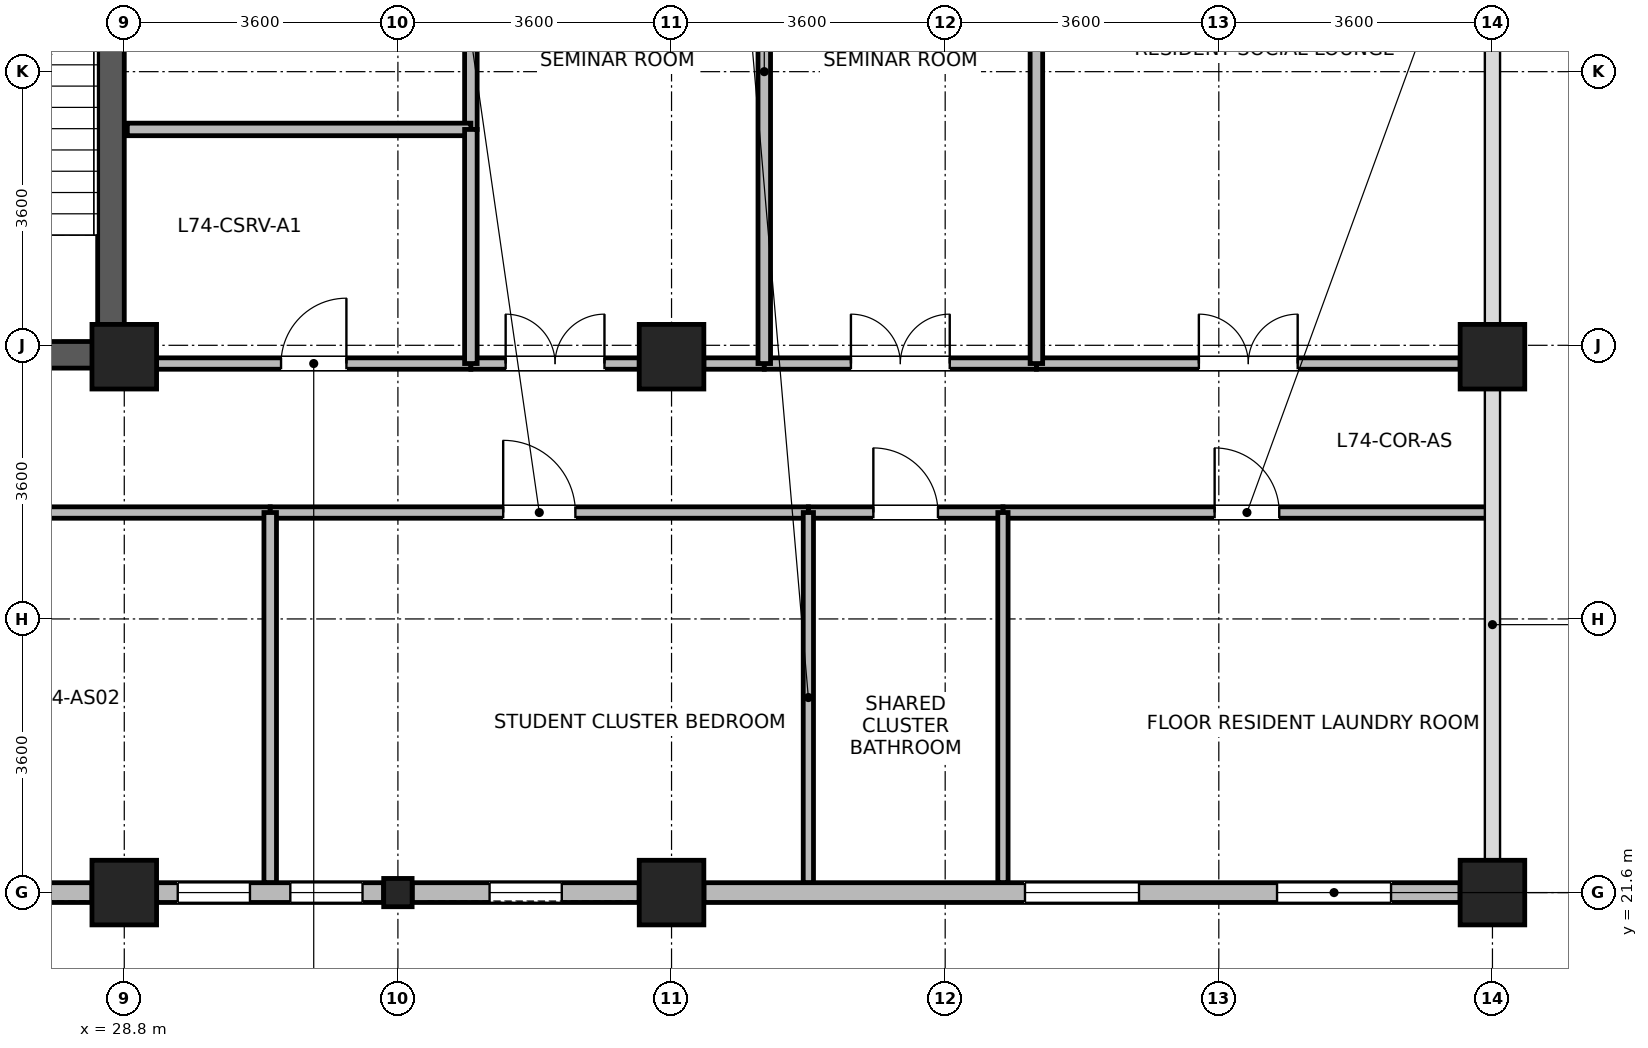
"""IFC4 building model, lengths in metres.
Left out: names, types, materials, properties, quantities, classifications, styles, units other than length and angle.
Written with IfcOpenShell. Run it as: python <this file> out.ifc"""

import sys

from ifc_helpers import new_model, si_unit, direction, frame, frame_2d, origin, origin_2d, place, context, subcontext, project, spatial, rectangle, i_section, extrude, source, transform, mapped, element, fill, save


model = new_model("IFC4")
c1 = context("Model", 3, precision=1e-05, world=origin(), true_north=direction((0.0, 1.0)))
c2 = subcontext(c1, "Body", "Model", "MODEL_VIEW")
j1 = project(units=[si_unit("LENGTHUNIT", "METRE"), si_unit("PLANEANGLEUNIT", "RADIAN")], contexts=[c1])
p1 = place(None, origin())
s1 = spatial("IfcSite", under=j1, at=p1, CompositionType="ELEMENT")
p2 = place(p1, origin())
s2 = spatial("IfcBuilding", under=s1, at=p2, CompositionType="ELEMENT")
p3 = place(p2, frame((0.0, 0.0, 286.9)))
s3 = spatial("IfcBuildingStorey", under=s2, at=p3, CompositionType="ELEMENT", Elevation=286.9)
p4 = place(p3, frame((28.625, 28.5, 0.0), z_axis=(0.0, 0.0, 1.0), x_axis=(0.0, 1.0, 0.0)))
e1 = element("IfcWall", 1, at=p4, inside=s3, PredefinedType="SHEAR", context=c2, shape_type="SweptSolid", body=[
    extrude(rectangle(XDim=7.7, YDim=0.35, at=frame_2d((3.85, 0.0))), origin(), (0.0, 0.0, 1.0), 3.475),
])
p5 = place(p3, frame((25.25, 28.675, 0.0), z_axis=(0.0, 0.0, 1.0), x_axis=(1.0, 0.0, 0.0)))
e2 = element("IfcWall", 2, at=p5, inside=s3, PredefinedType="SHEAR", context=c2, shape_type="SweptSolid", body=[
    extrude(rectangle(XDim=3.2, YDim=0.35, at=frame_2d((1.6, 0.0))), origin(), (0.0, 0.0, 1.0), 3.475),
])
m1 = source(origin(), c2, "Body", "SweptSolid", [
    extrude(rectangle(XDim=0.85, YDim=0.85, at=origin_2d()), origin(), (0.0, 0.0, 1.0), 3.7),
])
for number, where, z_axis, x_axis in (
    (3, (28.8, 21.6, 0.0), (0.0, 0.0, 1.0), (1.0, 0.0, 0.0)),
    (4, (28.8, 28.65, 0.0), (0.0, 0.0, 1.0), (1.0, 0.0, 0.0)),
    (5, (36.0, 21.6, 0.0), (0.0, 0.0, 1.0), (1.0, 0.0, 0.0)),
    (6, (36.0, 28.65, 0.0), (0.0, 0.0, 1.0), (1.0, 0.0, 0.0)),
    (7, (46.8, 21.6, 0.0), (0.0, 0.0, 1.0), (1.0, 0.0, 0.0)),
    (8, (46.8, 28.65, 0.0), (0.0, 0.0, 1.0), (1.0, 0.0, 0.0)),
):
    element("IfcColumn", number, at=place(p3, frame(where, z_axis=z_axis, x_axis=x_axis)), inside=s3, PredefinedType="COLUMN", context=c2, shape_type="MappedRepresentation", body=[
        mapped(m1, transform((0.0, 0.0, 0.0), x_axis=(1.0, 0.0, 0.0), y_axis=(0.0, 1.0, 0.0), z_axis=(0.0, 0.0, 1.0), scale=1.0)),
    ])
m2 = source(origin(), c2, "Body", "SweptSolid", [
    extrude(i_section(OverallWidth=0.374, OverallDepth=0.372, WebThickness=0.015, FlangeThickness=0.026, FilletRadius=0.015, at=origin_2d()), origin(), (0.0, 0.0, 1.0), 3.7),
])
p6 = place(p3, frame((32.4, 21.6, 0.0), z_axis=(0.0, 0.0, 1.0), x_axis=(1.0, 0.0, 0.0)))
e9 = element("IfcColumn", 9, at=p6, inside=s3, PredefinedType="COLUMN", context=c2, shape_type="MappedRepresentation", body=[
    mapped(m2, transform((0.0, 0.0, 0.0), x_axis=(1.0, 0.0, 0.0), y_axis=(0.0, 1.0, 0.0), z_axis=(0.0, 0.0, 1.0), scale=1.0)),
])
p7 = place(p3, frame((28.374, 21.6, 0.0), z_axis=(0.0, 0.0, 1.0), x_axis=(-1.0, 0.0, 0.0)))
e10 = element("IfcWall", 10, at=p7, inside=s3, PredefinedType="STANDARD", context=c2, shape_type="SweptSolid", body=[
    extrude(rectangle(XDim=2.986, YDim=0.26, at=frame_2d((1.493, 0.0))), origin(), (0.0, 0.0, 1.0), 3.055),
])
p8 = place(p7, frame((1.018, 0.0, 0.85)))
e11 = element("IfcOpeningElement", 11, at=p8, cuts=e10, PredefinedType="OPENING", context=c2, shape_type="SweptSolid", body=[
    extrude(rectangle(XDim=0.95, YDim=1.75, at=frame_2d((0.475, 0.875))), frame((0.0, 0.14, 0.0), z_axis=(0.0, -1.0, 0.0), x_axis=(1.0, 0.0, 0.0)), (0.0, 0.0, 1.0), 0.28),
])
p9 = place(p3, frame((32.212, 21.6, 0.0), z_axis=(0.0, 0.0, 1.0), x_axis=(-1.0, 0.0, 0.0)))
e12 = element("IfcWall", 12, at=p9, inside=s3, PredefinedType="STANDARD", context=c2, shape_type="SweptSolid", body=[
    extrude(rectangle(XDim=2.986, YDim=0.26, at=frame_2d((1.493, 0.0))), origin(), (0.0, 0.0, 1.0), 3.055),
])
p10 = place(p9, frame((0.278, 0.0, 0.85)))
e13 = element("IfcOpeningElement", 13, at=p10, cuts=e12, PredefinedType="OPENING", context=c2, shape_type="SweptSolid", body=[
    extrude(rectangle(XDim=0.95, YDim=1.75, at=frame_2d((0.475, 0.875))), frame((0.0, 0.14, 0.0), z_axis=(0.0, -1.0, 0.0), x_axis=(1.0, 0.0, 0.0)), (0.0, 0.0, 1.0), 0.28),
])
p11 = place(p9, frame((1.759, 0.0, 0.85)))
e14 = element("IfcOpeningElement", 14, at=p11, cuts=e12, PredefinedType="OPENING", context=c2, shape_type="SweptSolid", body=[
    extrude(rectangle(XDim=0.95, YDim=1.75, at=frame_2d((0.475, 0.875))), frame((0.0, 0.14, 0.0), z_axis=(0.0, -1.0, 0.0), x_axis=(1.0, 0.0, 0.0)), (0.0, 0.0, 1.0), 0.28),
])
p12 = place(p3, frame((35.574, 21.6, 0.0), z_axis=(0.0, 0.0, 1.0), x_axis=(-1.0, 0.0, 0.0)))
e15 = element("IfcWall", 15, at=p12, inside=s3, PredefinedType="STANDARD", context=c2, shape_type="SweptSolid", body=[
    extrude(rectangle(XDim=2.986, YDim=0.26, at=frame_2d((1.493, 0.0))), origin(), (0.0, 0.0, 1.0), 3.055),
])
p13 = place(p12, frame((1.018, 0.0, 0.85)))
e16 = element("IfcOpeningElement", 16, at=p13, cuts=e15, PredefinedType="OPENING", context=c2, shape_type="SweptSolid", body=[
    extrude(rectangle(XDim=0.95, YDim=1.75, at=frame_2d((0.475, 0.875))), frame((0.0, 0.14, 0.0), z_axis=(0.0, -1.0, 0.0), x_axis=(1.0, 0.0, 0.0)), (0.0, 0.0, 1.0), 0.28),
])
p14 = place(p3, frame((46.374, 21.6, 0.0), z_axis=(0.0, 0.0, 1.0), x_axis=(-1.0, 0.0, 0.0)))
e17 = element("IfcWall", 17, at=p14, inside=s3, PredefinedType="STANDARD", context=c2, shape_type="SweptSolid", body=[
    extrude(rectangle(XDim=9.948, YDim=0.26, at=frame_2d((4.974, 0.0))), origin(), (0.0, 0.0, 1.0), 3.055),
])
p15 = place(p14, frame((0.908, 0.0, 0.85)))
e18 = element("IfcOpeningElement", 18, at=p15, cuts=e17, PredefinedType="OPENING", context=c2, shape_type="SweptSolid", body=[
    extrude(rectangle(XDim=1.5, YDim=1.85, at=frame_2d((0.75, 0.925))), frame((0.0, 0.14, 0.0), z_axis=(0.0, -1.0, 0.0), x_axis=(1.0, 0.0, 0.0)), (0.0, 0.0, 1.0), 0.28),
])
p16 = place(p14, frame((4.224, 0.0, 0.85)))
e19 = element("IfcOpeningElement", 19, at=p16, cuts=e17, PredefinedType="OPENING", context=c2, shape_type="SweptSolid", body=[
    extrude(rectangle(XDim=1.5, YDim=1.85, at=frame_2d((0.75, 0.925))), frame((0.0, 0.14, 0.0), z_axis=(0.0, -1.0, 0.0), x_axis=(1.0, 0.0, 0.0)), (0.0, 0.0, 1.0), 0.28),
])
p17 = place(p3, frame((17.78, 26.6, 0.0), z_axis=(0.0, 0.0, 1.0), x_axis=(1.0, 0.0, 0.0)))
e20 = element("IfcWall", 20, at=p17, inside=s3, PredefinedType="PARTITIONING", context=c2, shape_type="SweptSolid", body=[
    extrude(rectangle(XDim=12.94, YDim=0.15, at=frame_2d((6.47, 0.0))), origin(), (0.0, 0.0, 1.0), 3.455),
])
p18 = place(p17, frame((6.02, 0.0, 0.0)))
e21 = element("IfcOpeningElement", 21, at=p18, cuts=e20, PredefinedType="OPENING", context=c2, shape_type="SweptSolid", body=[
    extrude(rectangle(XDim=0.9, YDim=2.08, at=frame_2d((0.45, 1.04))), frame((0.0, 0.085, 0.0), z_axis=(0.0, -1.0, 0.0), x_axis=(1.0, 0.0, 0.0)), (0.0, 0.0, 1.0), 0.17),
])
p19 = place(p3, frame((30.72, 26.6, 0.0), z_axis=(0.0, 0.0, 1.0), x_axis=(1.0, 0.0, 0.0)))
e22 = element("IfcWall", 22, at=p19, inside=s3, PredefinedType="PARTITIONING", context=c2, shape_type="SweptSolid", body=[
    extrude(rectangle(XDim=7.08, YDim=0.15, at=frame_2d((3.54, 0.0))), origin(), (0.0, 0.0, 1.0), 3.455),
])
p20 = place(p19, frame((3.065, 0.0, 0.0)))
e23 = element("IfcOpeningElement", 23, at=p20, cuts=e22, PredefinedType="OPENING", context=c2, shape_type="SweptSolid", body=[
    extrude(rectangle(XDim=0.95, YDim=2.1, at=frame_2d((0.475, 1.05))), frame((0.0, 0.085, 0.0), z_axis=(0.0, -1.0, 0.0), x_axis=(1.0, 0.0, 0.0)), (0.0, 0.0, 1.0), 0.17),
])
p21 = place(p3, frame((40.36, 26.6, 0.0), z_axis=(0.0, 0.0, 1.0), x_axis=(1.0, 0.0, 0.0)))
e24 = element("IfcWall", 24, at=p21, inside=s3, PredefinedType="PARTITIONING", context=c2, shape_type="SweptSolid", body=[
    extrude(rectangle(XDim=6.42, YDim=0.15, at=frame_2d((3.21, 0.0))), origin(), (0.0, 0.0, 1.0), 3.455),
])
p22 = place(p21, frame((2.785, 0.0, 0.0)))
e25 = element("IfcOpeningElement", 25, at=p22, cuts=e24, PredefinedType="OPENING", context=c2, shape_type="SweptSolid", body=[
    extrude(rectangle(XDim=0.85, YDim=2.04, at=frame_2d((0.425, 1.02))), frame((0.0, 0.085, 0.0), z_axis=(0.0, -1.0, 0.0), x_axis=(1.0, 0.0, 0.0)), (0.0, 0.0, 1.0), 0.17),
])
p23 = place(p3, frame((40.8, 28.56, 0.0), z_axis=(0.0, 0.0, 1.0), x_axis=(1.0, 0.0, 0.0)))
e26 = element("IfcWall", 26, at=p23, inside=s3, PredefinedType="PARTITIONING", context=c2, shape_type="SweptSolid", body=[
    extrude(rectangle(XDim=5.575, YDim=0.15, at=frame_2d((2.788, 0.0))), origin(), (0.0, 0.0, 1.0), 2.905),
])
p24 = place(p23, frame((2.137, 0.0, 0.0)))
e27 = element("IfcOpeningElement", 27, at=p24, cuts=e26, PredefinedType="OPENING", context=c2, shape_type="SweptSolid", body=[
    extrude(rectangle(XDim=1.3, YDim=2.12, at=frame_2d((0.65, 1.06))), frame((0.0, 0.085, 0.0), z_axis=(0.0, -1.0, 0.0), x_axis=(1.0, 0.0, 0.0)), (0.0, 0.0, 1.0), 0.17),
])
p25 = place(p3, frame((29.225, 28.56, 0.0), z_axis=(0.0, 0.0, 1.0), x_axis=(1.0, 0.0, 0.0)))
e28 = element("IfcWall", 28, at=p25, inside=s3, PredefinedType="PARTITIONING", context=c2, shape_type="SweptSolid", body=[
    extrude(rectangle(XDim=4.135, YDim=0.15, at=frame_2d((2.067, 0.0))), origin(), (0.0, 0.0, 1.0), 2.905),
])
p26 = place(p25, frame((1.637, 0.0, 0.0)))
e29 = element("IfcOpeningElement", 29, at=p26, cuts=e28, PredefinedType="OPENING", context=c2, shape_type="SweptSolid", body=[
    extrude(rectangle(XDim=0.86, YDim=2.02, at=frame_2d((0.43, 1.01))), frame((0.0, 0.085, 0.0), z_axis=(0.0, -1.0, 0.0), x_axis=(1.0, 0.0, 0.0)), (0.0, 0.0, 1.0), 0.17),
])
p27 = place(p3, frame((33.36, 28.56, 0.0), z_axis=(0.0, 0.0, 1.0), x_axis=(1.0, 0.0, 0.0)))
e30 = element("IfcWall", 30, at=p27, inside=s3, PredefinedType="PARTITIONING", context=c2, shape_type="SweptSolid", body=[
    extrude(rectangle(XDim=2.215, YDim=0.15, at=frame_2d((1.107, 0.0))), origin(), (0.0, 0.0, 1.0), 2.905),
])
p28 = place(p27, frame((0.458, 0.0, 0.0)))
e31 = element("IfcOpeningElement", 31, at=p28, cuts=e30, PredefinedType="OPENING", context=c2, shape_type="SweptSolid", body=[
    extrude(rectangle(XDim=1.3, YDim=2.12, at=frame_2d((0.65, 1.06))), frame((0.0, 0.085, 0.0), z_axis=(0.0, -1.0, 0.0), x_axis=(1.0, 0.0, 0.0)), (0.0, 0.0, 1.0), 0.17),
])
p29 = place(p3, frame((36.425, 28.56, 0.0), z_axis=(0.0, 0.0, 1.0), x_axis=(1.0, 0.0, 0.0)))
e32 = element("IfcWall", 32, at=p29, inside=s3, PredefinedType="PARTITIONING", context=c2, shape_type="SweptSolid", body=[
    extrude(rectangle(XDim=0.795, YDim=0.15, at=frame_2d((0.397, 0.0))), origin(), (0.0, 0.0, 1.0), 2.905),
])
p30 = place(p3, frame((37.22, 28.56, 0.0), z_axis=(0.0, 0.0, 1.0), x_axis=(1.0, 0.0, 0.0)))
e33 = element("IfcWall", 33, at=p30, inside=s3, PredefinedType="PARTITIONING", context=c2, shape_type="SweptSolid", body=[
    extrude(rectangle(XDim=3.58, YDim=0.15, at=frame_2d((1.79, 0.0))), origin(), (0.0, 0.0, 1.0), 2.905),
])
p31 = place(p30, frame((1.14, 0.0, 0.0)))
e34 = element("IfcOpeningElement", 34, at=p31, cuts=e33, PredefinedType="OPENING", context=c2, shape_type="SweptSolid", body=[
    extrude(rectangle(XDim=1.3, YDim=2.12, at=frame_2d((0.65, 1.06))), frame((0.0, 0.085, 0.0), z_axis=(0.0, -1.0, 0.0), x_axis=(1.0, 0.0, 0.0)), (0.0, 0.0, 1.0), 0.17),
])
p32 = place(p3, frame((37.8, 26.6, 0.0), z_axis=(0.0, 0.0, 1.0), x_axis=(1.0, 0.0, 0.0)))
e35 = element("IfcWall", 35, at=p32, inside=s3, PredefinedType="PARTITIONING", context=c2, shape_type="SweptSolid", body=[
    extrude(rectangle(XDim=2.56, YDim=0.15, at=frame_2d((1.28, 0.0))), origin(), (0.0, 0.0, 1.0), 3.455),
])
p33 = place(p32, frame((0.855, 0.0, 0.0)))
e36 = element("IfcOpeningElement", 36, at=p33, cuts=e35, PredefinedType="OPENING", context=c2, shape_type="SweptSolid", body=[
    extrude(rectangle(XDim=0.85, YDim=2.04, at=frame_2d((0.425, 1.02))), frame((0.0, 0.085, 0.0), z_axis=(0.0, -1.0, 0.0), x_axis=(1.0, 0.0, 0.0)), (0.0, 0.0, 1.0), 0.17),
])
for number, where, z_axis, x_axis in (
    (37, (37.22, 28.56, 0.0), (0.0, 0.0, 1.0), (0.0, 1.0, 0.0)),
    (38, (40.8, 28.56, 0.0), (0.0, 0.0, 1.0), (0.0, 1.0, 0.0)),
):
    element("IfcWall", number, at=place(p3, frame(where, z_axis=z_axis, x_axis=x_axis)), inside=s3, PredefinedType="PARTITIONING", context=c2, shape_type="SweptSolid", body=[
        extrude(rectangle(XDim=7.68, YDim=0.165, at=frame_2d((3.84, 0.0))), origin(), (0.0, 0.0, 1.0), 3.455),
    ])
p34 = place(p3, frame((30.72, 21.732, 0.0), z_axis=(0.0, 0.0, 1.0), x_axis=(0.0, 1.0, 0.0)))
e39 = element("IfcWall", 39, at=p34, inside=s3, PredefinedType="PARTITIONING", context=c2, shape_type="SweptSolid", body=[
    extrude(rectangle(XDim=4.868, YDim=0.165, at=frame_2d((2.434, 0.0))), origin(), (0.0, 0.0, 1.0), 3.455),
])
for number, where, z_axis, x_axis in (
    (40, (37.8, 21.732, 0.0), (0.0, 0.0, 1.0), (0.0, 1.0, 0.0)),
    (41, (40.36, 21.732, 0.0), (0.0, 0.0, 1.0), (0.0, 1.0, 0.0)),
):
    element("IfcWall", number, at=place(p3, frame(where, z_axis=z_axis, x_axis=x_axis)), inside=s3, PredefinedType="PARTITIONING", context=c2, shape_type="SweptSolid", body=[
        extrude(rectangle(XDim=4.868, YDim=0.135, at=frame_2d((2.434, 0.0))), origin(), (0.0, 0.0, 1.0), 3.455),
    ])
p35 = place(p3, frame((33.36, 31.64, 0.0), z_axis=(0.0, 0.0, 1.0), x_axis=(0.0, 1.0, 0.0)))
e42 = element("IfcWall", 42, at=p35, inside=s3, PredefinedType="PARTITIONING", context=c2, shape_type="SweptSolid", body=[
    extrude(rectangle(XDim=4.6, YDim=0.165, at=frame_2d((2.3, 0.0))), origin(), (0.0, 0.0, 1.0), 3.455),
])
p36 = place(p3, frame((28.84, 31.64, 0.0), z_axis=(0.0, 0.0, 1.0), x_axis=(1.0, 0.0, 0.0)))
e43 = element("IfcWall", 43, at=p36, inside=s3, PredefinedType="PARTITIONING", context=c2, shape_type="SweptSolid", body=[
    extrude(rectangle(XDim=4.52, YDim=0.165, at=frame_2d((2.26, 0.0))), origin(), (0.0, 0.0, 1.0), 3.455),
])
p37 = place(p3, frame((33.36, 28.56, 0.0), z_axis=(0.0, 0.0, 1.0), x_axis=(0.0, 1.0, 0.0)))
e44 = element("IfcWall", 44, at=p37, inside=s3, PredefinedType="PARTITIONING", context=c2, shape_type="SweptSolid", body=[
    extrude(rectangle(XDim=3.08, YDim=0.165, at=frame_2d((1.54, 0.0))), origin(), (0.0, 0.0, 1.0), 3.455),
])
p38 = place(p10, origin())
e45 = element("IfcWindow", 45, at=p38, inside=s3, PartitioningType="SINGLE_PANEL", PredefinedType="WINDOW", context=c2, shape_type="SweptSolid", body=[
    extrude(rectangle(XDim=0.95, YDim=1.75, at=frame_2d((0.475, 0.875))), frame((0.0, 0.03, 0.0), z_axis=(0.0, -1.0, 0.0), x_axis=(1.0, 0.0, 0.0)), (0.0, 0.0, 1.0), 0.06),
])
fill(e13, e45)
p39 = place(p11, origin())
e46 = element("IfcWindow", 46, at=p39, inside=s3, PartitioningType="SINGLE_PANEL", PredefinedType="WINDOW", context=c2, shape_type="SweptSolid", body=[
    extrude(rectangle(XDim=0.95, YDim=1.75, at=frame_2d((0.475, 0.875))), frame((0.0, 0.03, 0.0), z_axis=(0.0, -1.0, 0.0), x_axis=(1.0, 0.0, 0.0)), (0.0, 0.0, 1.0), 0.06),
])
fill(e14, e46)
p40 = place(p13, origin())
e47 = element("IfcWindow", 47, at=p40, inside=s3, PartitioningType="SINGLE_PANEL", PredefinedType="WINDOW", context=c2, shape_type="SweptSolid", body=[
    extrude(rectangle(XDim=0.95, YDim=1.75, at=frame_2d((0.475, 0.875))), frame((0.0, 0.03, 0.0), z_axis=(0.0, -1.0, 0.0), x_axis=(1.0, 0.0, 0.0)), (0.0, 0.0, 1.0), 0.06),
])
fill(e16, e47)
p41 = place(p15, origin())
e48 = element("IfcWindow", 48, at=p41, inside=s3, PartitioningType="SINGLE_PANEL", PredefinedType="WINDOW", context=c2, shape_type="SweptSolid", body=[
    extrude(rectangle(XDim=1.5, YDim=1.85, at=frame_2d((0.75, 0.925))), frame((0.0, 0.03, 0.0), z_axis=(0.0, -1.0, 0.0), x_axis=(1.0, 0.0, 0.0)), (0.0, 0.0, 1.0), 0.06),
])
fill(e18, e48)
p42 = place(p16, origin())
e49 = element("IfcWindow", 49, at=p42, inside=s3, PartitioningType="SINGLE_PANEL", PredefinedType="WINDOW", context=c2, shape_type="SweptSolid", body=[
    extrude(rectangle(XDim=1.5, YDim=1.85, at=frame_2d((0.75, 0.925))), frame((0.0, 0.03, 0.0), z_axis=(0.0, -1.0, 0.0), x_axis=(1.0, 0.0, 0.0)), (0.0, 0.0, 1.0), 0.06),
])
fill(e19, e49)
p43 = place(p20, origin())
e50 = element("IfcDoor", 50, at=p43, inside=s3, OperationType="SINGLE_SWING_LEFT", PredefinedType="DOOR", context=c2, shape_type="SweptSolid", body=[
    extrude(rectangle(XDim=0.95, YDim=2.1, at=frame_2d((0.475, 1.05))), frame((0.0, 0.025, 0.0), z_axis=(0.0, -1.0, 0.0), x_axis=(1.0, 0.0, 0.0)), (0.0, 0.0, 1.0), 0.05),
])
fill(e23, e50)
p44 = place(p22, origin())
e51 = element("IfcDoor", 51, at=p44, inside=s3, OperationType="SINGLE_SWING_LEFT", PredefinedType="DOOR", context=c2, shape_type="SweptSolid", body=[
    extrude(rectangle(XDim=0.85, YDim=2.04, at=frame_2d((0.425, 1.02))), frame((0.0, 0.025, 0.0), z_axis=(0.0, -1.0, 0.0), x_axis=(1.0, 0.0, 0.0)), (0.0, 0.0, 1.0), 0.05),
])
fill(e25, e51)
p45 = place(p24, origin())
e52 = element("IfcDoor", 52, at=p45, inside=s3, OperationType="DOUBLE_DOOR_SINGLE_SWING", PredefinedType="DOOR", context=c2, shape_type="SweptSolid", body=[
    extrude(rectangle(XDim=1.3, YDim=2.12, at=frame_2d((0.65, 1.06))), frame((0.0, 0.025, 0.0), z_axis=(0.0, -1.0, 0.0), x_axis=(1.0, 0.0, 0.0)), (0.0, 0.0, 1.0), 0.05),
])
fill(e27, e52)
p46 = place(p26, origin())
e53 = element("IfcDoor", 53, at=p46, inside=s3, OperationType="SINGLE_SWING_RIGHT", PredefinedType="DOOR", context=c2, shape_type="SweptSolid", body=[
    extrude(rectangle(XDim=0.86, YDim=2.02, at=frame_2d((0.43, 1.01))), frame((0.0, 0.025, 0.0), z_axis=(0.0, -1.0, 0.0), x_axis=(1.0, 0.0, 0.0)), (0.0, 0.0, 1.0), 0.05),
])
fill(e29, e53)
p47 = place(p28, origin())
e54 = element("IfcDoor", 54, at=p47, inside=s3, OperationType="DOUBLE_DOOR_SINGLE_SWING", PredefinedType="DOOR", context=c2, shape_type="SweptSolid", body=[
    extrude(rectangle(XDim=1.3, YDim=2.12, at=frame_2d((0.65, 1.06))), frame((0.0, 0.025, 0.0), z_axis=(0.0, -1.0, 0.0), x_axis=(1.0, 0.0, 0.0)), (0.0, 0.0, 1.0), 0.05),
])
fill(e31, e54)
p48 = place(p31, origin())
e55 = element("IfcDoor", 55, at=p48, inside=s3, OperationType="DOUBLE_DOOR_SINGLE_SWING", PredefinedType="DOOR", context=c2, shape_type="SweptSolid", body=[
    extrude(rectangle(XDim=1.3, YDim=2.12, at=frame_2d((0.65, 1.06))), frame((0.0, 0.025, 0.0), z_axis=(0.0, -1.0, 0.0), x_axis=(1.0, 0.0, 0.0)), (0.0, 0.0, 1.0), 0.05),
])
fill(e34, e55)
p49 = place(p33, origin())
e56 = element("IfcDoor", 56, at=p49, inside=s3, OperationType="SINGLE_SWING_LEFT", PredefinedType="DOOR", context=c2, shape_type="SweptSolid", body=[
    extrude(rectangle(XDim=0.85, YDim=2.04, at=frame_2d((0.425, 1.02))), frame((0.0, 0.025, 0.0), z_axis=(0.0, -1.0, 0.0), x_axis=(1.0, 0.0, 0.0)), (0.0, 0.0, 1.0), 0.05),
])
fill(e36, e56)
save(model, sys.argv[1])
